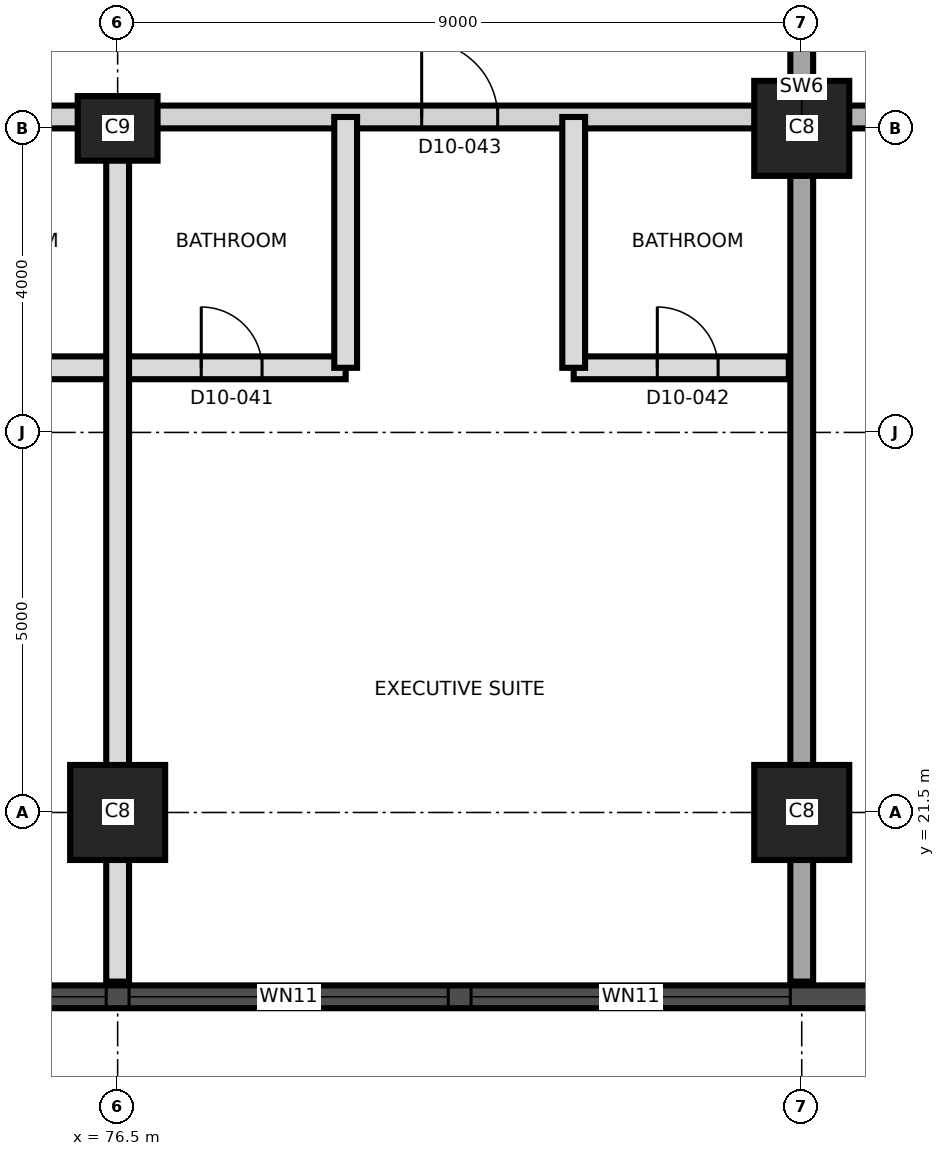
"""IFC4 building model, lengths in metres.
Left out: names, types, materials, properties, quantities, classifications, styles, units other than length and angle.
Written with IfcOpenShell. Run it as: python <this file> out.ifc"""

import sys

from ifc_helpers import new_model, si_unit, direction, frame, frame_2d, origin, origin_2d, place, context, subcontext, project, spatial, rectangle, extrude, element, fill, save


model = new_model("IFC4")
c1 = context("Model", 3, precision=1e-05, world=origin(), true_north=direction((0.0, 1.0)))
c2 = subcontext(c1, "Body", "Model", "MODEL_VIEW")
j1 = project(units=[si_unit("LENGTHUNIT", "METRE"), si_unit("PLANEANGLEUNIT", "RADIAN")], contexts=[c1])
p1 = place(None, origin())
s1 = spatial("IfcSite", under=j1, at=p1, CompositionType="ELEMENT")
p2 = place(p1, origin())
s2 = spatial("IfcBuilding", under=s1, at=p2, CompositionType="ELEMENT")
p3 = place(p2, frame((0.0, 0.0, 120.4)))
s3 = spatial("IfcBuildingStorey", under=s2, at=p3, CompositionType="ELEMENT", Elevation=120.4)
for number, where, z_axis, x_axis in (
    (1, (76.5, 21.5, 0.0), (0.0, 0.0, 1.0), (1.0, 0.0, 0.0)),
    (2, (85.5, 21.5, 0.0), (0.0, 0.0, 1.0), (1.0, 0.0, 0.0)),
):
    element("IfcColumn", number, at=place(p3, frame(where, z_axis=z_axis, x_axis=x_axis)), inside=s3, PredefinedType="COLUMN", context=c2, shape_type="SweptSolid", body=[
        extrude(rectangle(XDim=1.25, YDim=1.25, at=origin_2d()), origin(), (0.0, 0.0, 1.0), 3.7),
    ])
p4 = place(p3, frame((76.5, 30.5, 0.0), z_axis=(0.0, 0.0, 1.0), x_axis=(1.0, 0.0, 0.0)))
e3 = element("IfcColumn", 3, at=p4, inside=s3, PredefinedType="COLUMN", context=c2, shape_type="SweptSolid", body=[
    extrude(rectangle(XDim=1.05, YDim=0.85, at=origin_2d()), origin(), (0.0, 0.0, 1.0), 3.7),
])
p5 = place(p3, frame((85.5, 30.5, 0.0), z_axis=(0.0, 0.0, 1.0), x_axis=(1.0, 0.0, 0.0)))
e4 = element("IfcColumn", 4, at=p5, inside=s3, PredefinedType="COLUMN", context=c2, shape_type="SweptSolid", body=[
    extrude(rectangle(XDim=1.25, YDim=1.25, at=origin_2d()), origin(), (0.0, 0.0, 1.0), 3.7),
])
p6 = place(p3, frame((85.5, 19.275, 0.0), z_axis=(0.0, 0.0, 1.0), x_axis=(0.0, 1.0, 0.0)))
e5 = element("IfcWall", 5, at=p6, inside=s3, PredefinedType="SHEAR", context=c2, shape_type="SweptSolid", body=[
    extrude(rectangle(XDim=22.45, YDim=0.3, at=frame_2d((11.225, 0.0))), origin(), (0.0, 0.0, 1.0), 3.7),
])
p7 = place(p6, frame((12.425, 0.0, 0.0)))
e6 = element("IfcOpeningElement", 6, at=p7, cuts=e5, PredefinedType="OPENING", context=c2, shape_type="SweptSolid", body=[
    extrude(rectangle(XDim=1.4, YDim=2.1, at=frame_2d((0.7, 1.05))), frame((0.0, 0.16, 0.0), z_axis=(0.0, -1.0, 0.0), x_axis=(1.0, 0.0, 0.0)), (0.0, 0.0, 1.0), 0.32),
])
p8 = place(p3, frame((44.01, 19.075, 0.0), z_axis=(0.0, 0.0, 1.0), x_axis=(1.0, 0.0, 0.0)))
e7 = element("IfcWall", 7, at=p8, inside=s3, PredefinedType="SOLIDWALL", context=c2, shape_type="SweptSolid", body=[
    extrude(rectangle(XDim=43.478, YDim=0.3, at=frame_2d((21.739, 0.0))), origin(), (0.0, 0.0, 1.0), 3.4),
])
p9 = place(p8, frame((1.845, 0.0, 0.3)))
e8 = element("IfcOpeningElement", 8, at=p9, cuts=e7, PredefinedType="OPENING", context=c2, shape_type="SweptSolid", body=[
    extrude(rectangle(XDim=1.8, YDim=2.4, at=frame_2d((0.9, 1.2))), frame((0.0, 0.16, 0.0), z_axis=(0.0, -1.0, 0.0), x_axis=(1.0, 0.0, 0.0)), (0.0, 0.0, 1.0), 0.32),
])
p10 = place(p8, frame((5.64, 0.0, 0.9)))
e9 = element("IfcOpeningElement", 9, at=p10, cuts=e7, PredefinedType="OPENING", context=c2, shape_type="SweptSolid", body=[
    extrude(rectangle(XDim=4.2, YDim=1.5, at=frame_2d((2.1, 0.75))), frame((0.0, 0.16, 0.0), z_axis=(0.0, -1.0, 0.0), x_axis=(1.0, 0.0, 0.0)), (0.0, 0.0, 1.0), 0.32),
])
p11 = place(p8, frame((10.14, 0.0, 0.9)))
e10 = element("IfcOpeningElement", 10, at=p11, cuts=e7, PredefinedType="OPENING", context=c2, shape_type="SweptSolid", body=[
    extrude(rectangle(XDim=4.2, YDim=1.5, at=frame_2d((2.1, 0.75))), frame((0.0, 0.16, 0.0), z_axis=(0.0, -1.0, 0.0), x_axis=(1.0, 0.0, 0.0)), (0.0, 0.0, 1.0), 0.32),
])
p12 = place(p8, frame((14.64, 0.0, 0.9)))
e11 = element("IfcOpeningElement", 11, at=p12, cuts=e7, PredefinedType="OPENING", context=c2, shape_type="SweptSolid", body=[
    extrude(rectangle(XDim=4.2, YDim=1.5, at=frame_2d((2.1, 0.75))), frame((0.0, 0.16, 0.0), z_axis=(0.0, -1.0, 0.0), x_axis=(1.0, 0.0, 0.0)), (0.0, 0.0, 1.0), 0.32),
])
p13 = place(p8, frame((19.14, 0.0, 0.9)))
e12 = element("IfcOpeningElement", 12, at=p13, cuts=e7, PredefinedType="OPENING", context=c2, shape_type="SweptSolid", body=[
    extrude(rectangle(XDim=4.2, YDim=1.5, at=frame_2d((2.1, 0.75))), frame((0.0, 0.16, 0.0), z_axis=(0.0, -1.0, 0.0), x_axis=(1.0, 0.0, 0.0)), (0.0, 0.0, 1.0), 0.32),
])
p14 = place(p8, frame((23.64, 0.0, 0.9)))
e13 = element("IfcOpeningElement", 13, at=p14, cuts=e7, PredefinedType="OPENING", context=c2, shape_type="SweptSolid", body=[
    extrude(rectangle(XDim=4.2, YDim=1.5, at=frame_2d((2.1, 0.75))), frame((0.0, 0.16, 0.0), z_axis=(0.0, -1.0, 0.0), x_axis=(1.0, 0.0, 0.0)), (0.0, 0.0, 1.0), 0.32),
])
p15 = place(p8, frame((28.14, 0.0, 0.9)))
e14 = element("IfcOpeningElement", 14, at=p15, cuts=e7, PredefinedType="OPENING", context=c2, shape_type="SweptSolid", body=[
    extrude(rectangle(XDim=4.2, YDim=1.5, at=frame_2d((2.1, 0.75))), frame((0.0, 0.16, 0.0), z_axis=(0.0, -1.0, 0.0), x_axis=(1.0, 0.0, 0.0)), (0.0, 0.0, 1.0), 0.32),
])
p16 = place(p8, frame((32.64, 0.0, 0.9)))
e15 = element("IfcOpeningElement", 15, at=p16, cuts=e7, PredefinedType="OPENING", context=c2, shape_type="SweptSolid", body=[
    extrude(rectangle(XDim=4.2, YDim=1.5, at=frame_2d((2.1, 0.75))), frame((0.0, 0.16, 0.0), z_axis=(0.0, -1.0, 0.0), x_axis=(1.0, 0.0, 0.0)), (0.0, 0.0, 1.0), 0.32),
])
p17 = place(p8, frame((37.14, 0.0, 0.9)))
e16 = element("IfcOpeningElement", 16, at=p17, cuts=e7, PredefinedType="OPENING", context=c2, shape_type="SweptSolid", body=[
    extrude(rectangle(XDim=4.2, YDim=1.5, at=frame_2d((2.1, 0.75))), frame((0.0, 0.16, 0.0), z_axis=(0.0, -1.0, 0.0), x_axis=(1.0, 0.0, 0.0)), (0.0, 0.0, 1.0), 0.32),
])
p18 = place(p3, frame((73.5, 27.35, 0.0), z_axis=(0.0, 0.0, 1.0), x_axis=(1.0, 0.0, 0.0)))
e17 = element("IfcWall", 17, at=p18, inside=s3, PredefinedType="PARTITIONING", context=c2, shape_type="SweptSolid", body=[
    extrude(rectangle(XDim=6.0, YDim=0.3, at=frame_2d((3.0, 0.0))), origin(), (0.0, 0.0, 1.0), 3.4),
])
p19 = place(p18, frame((1.1, 0.0, 0.0)))
e18 = element("IfcOpeningElement", 18, at=p19, cuts=e17, PredefinedType="OPENING", context=c2, shape_type="SweptSolid", body=[
    extrude(rectangle(XDim=0.8, YDim=2.1, at=frame_2d((0.4, 1.05))), frame((0.0, 0.16, 0.0), z_axis=(0.0, -1.0, 0.0), x_axis=(1.0, 0.0, 0.0)), (0.0, 0.0, 1.0), 0.32),
])
p20 = place(p18, frame((4.1, 0.0, 0.0)))
e19 = element("IfcOpeningElement", 19, at=p20, cuts=e17, PredefinedType="OPENING", context=c2, shape_type="SweptSolid", body=[
    extrude(rectangle(XDim=0.8, YDim=2.1, at=frame_2d((0.4, 1.05))), frame((0.0, 0.16, 0.0), z_axis=(0.0, -1.0, 0.0), x_axis=(1.0, 0.0, 0.0)), (0.0, 0.0, 1.0), 0.32),
])
p21 = place(p3, frame((82.5, 27.35, 0.0), z_axis=(0.0, 0.0, 1.0), x_axis=(1.0, 0.0, 0.0)))
e20 = element("IfcWall", 20, at=p21, inside=s3, PredefinedType="PARTITIONING", context=c2, shape_type="SweptSolid", body=[
    extrude(rectangle(XDim=2.83, YDim=0.3, at=frame_2d((1.415, 0.0))), origin(), (0.0, 0.0, 1.0), 3.4),
])
p22 = place(p21, frame((1.1, 0.0, 0.0)))
e21 = element("IfcOpeningElement", 21, at=p22, cuts=e20, PredefinedType="OPENING", context=c2, shape_type="SweptSolid", body=[
    extrude(rectangle(XDim=0.8, YDim=2.1, at=frame_2d((0.4, 1.05))), frame((0.0, 0.16, 0.0), z_axis=(0.0, -1.0, 0.0), x_axis=(1.0, 0.0, 0.0)), (0.0, 0.0, 1.0), 0.32),
])
p23 = place(p3, frame((58.8, 30.65, 0.0), z_axis=(0.0, 0.0, 1.0), x_axis=(1.0, 0.0, 0.0)))
e22 = element("IfcWall", 22, at=p23, inside=s3, PredefinedType="PARTITIONING", context=c2, shape_type="SweptSolid", body=[
    extrude(rectangle(XDim=26.53, YDim=0.3, at=frame_2d((13.265, 0.0))), origin(), (0.0, 0.0, 1.0), 3.4),
])
p24 = place(p23, frame((0.835, 0.0, 0.0)))
e23 = element("IfcOpeningElement", 23, at=p24, cuts=e22, PredefinedType="OPENING", context=c2, shape_type="SweptSolid", body=[
    extrude(rectangle(XDim=1.2, YDim=2.1, at=frame_2d((0.6, 1.05))), frame((0.0, 0.16, 0.0), z_axis=(0.0, -1.0, 0.0), x_axis=(1.0, 0.0, 0.0)), (0.0, 0.0, 1.0), 0.32),
])
p25 = place(p23, frame((4.085, 0.0, 0.0)))
e24 = element("IfcOpeningElement", 24, at=p25, cuts=e22, PredefinedType="OPENING", context=c2, shape_type="SweptSolid", body=[
    extrude(rectangle(XDim=1.0, YDim=2.1, at=frame_2d((0.5, 1.05))), frame((0.0, 0.16, 0.0), z_axis=(0.0, -1.0, 0.0), x_axis=(1.0, 0.0, 0.0)), (0.0, 0.0, 1.0), 0.32),
])
p26 = place(p23, frame((12.7, 0.0, 0.0)))
e25 = element("IfcOpeningElement", 25, at=p26, cuts=e22, PredefinedType="OPENING", context=c2, shape_type="SweptSolid", body=[
    extrude(rectangle(XDim=1.0, YDim=2.4, at=frame_2d((0.5, 1.2))), frame((0.0, 0.16, 0.0), z_axis=(0.0, -1.0, 0.0), x_axis=(1.0, 0.0, 0.0)), (0.0, 0.0, 1.0), 0.32),
])
p27 = place(p23, frame((21.7, 0.0, 0.0)))
e26 = element("IfcOpeningElement", 26, at=p27, cuts=e22, PredefinedType="OPENING", context=c2, shape_type="SweptSolid", body=[
    extrude(rectangle(XDim=1.0, YDim=2.4, at=frame_2d((0.5, 1.2))), frame((0.0, 0.16, 0.0), z_axis=(0.0, -1.0, 0.0), x_axis=(1.0, 0.0, 0.0)), (0.0, 0.0, 1.0), 0.32),
])
p28 = place(p3, frame((85.67, 30.65, 0.0), z_axis=(0.0, 0.0, 1.0), x_axis=(1.0, 0.0, 0.0)))
e27 = element("IfcWall", 27, at=p28, inside=s3, PredefinedType="SHEAR", context=c2, shape_type="SweptSolid", body=[
    extrude(rectangle(XDim=9.58, YDim=0.3, at=frame_2d((4.79, 0.0))), origin(), (0.0, 0.0, 1.0), 3.4),
])
p29 = place(p28, frame((2.08, 0.0, 0.0)))
e28 = element("IfcOpeningElement", 28, at=p29, cuts=e27, PredefinedType="OPENING", context=c2, shape_type="SweptSolid", body=[
    extrude(rectangle(XDim=1.2, YDim=2.1, at=frame_2d((0.6, 1.05))), frame((0.0, 0.16, 0.0), z_axis=(0.0, -1.0, 0.0), x_axis=(1.0, 0.0, 0.0)), (0.0, 0.0, 1.0), 0.32),
])
p30 = place(p28, frame((5.63, 0.0, 0.0)))
e29 = element("IfcOpeningElement", 29, at=p30, cuts=e27, PredefinedType="OPENING", context=c2, shape_type="SweptSolid", body=[
    extrude(rectangle(XDim=1.0, YDim=2.1, at=frame_2d((0.5, 1.05))), frame((0.0, 0.16, 0.0), z_axis=(0.0, -1.0, 0.0), x_axis=(1.0, 0.0, 0.0)), (0.0, 0.0, 1.0), 0.32),
])
p31 = place(p3, frame((76.5, 19.275, 0.0), z_axis=(0.0, 0.0, 1.0), x_axis=(0.0, 1.0, 0.0)))
e30 = element("IfcWall", 30, at=p31, inside=s3, PredefinedType="PARTITIONING", context=c2, shape_type="SweptSolid", body=[
    extrude(rectangle(XDim=11.375, YDim=0.3, at=frame_2d((5.688, 0.0))), origin(), (0.0, 0.0, 1.0), 3.35),
])
for number, where, z_axis, x_axis in (
    (31, (79.5, 27.35, 0.0), (0.0, 0.0, 1.0), (0.0, 1.0, 0.0)),
    (32, (82.5, 27.35, 0.0), (0.0, 0.0, 1.0), (0.0, 1.0, 0.0)),
):
    element("IfcWall", number, at=place(p3, frame(where, z_axis=z_axis, x_axis=x_axis)), inside=s3, PredefinedType="PARTITIONING", context=c2, shape_type="SweptSolid", body=[
        extrude(rectangle(XDim=3.3, YDim=0.3, at=frame_2d((1.65, 0.0))), origin(), (0.0, 0.0, 1.0), 3.4),
    ])
p32 = place(p15, origin())
e33 = element("IfcWindow", 33, at=p32, inside=s3, PartitioningType="SINGLE_PANEL", PredefinedType="WINDOW", context=c2, shape_type="SweptSolid", body=[
    extrude(rectangle(XDim=4.2, YDim=1.5, at=frame_2d((2.1, 0.75))), frame((0.0, 0.03, 0.0), z_axis=(0.0, -1.0, 0.0), x_axis=(1.0, 0.0, 0.0)), (0.0, 0.0, 1.0), 0.06),
])
fill(e14, e33)
p33 = place(p16, origin())
e34 = element("IfcWindow", 34, at=p33, inside=s3, PartitioningType="SINGLE_PANEL", PredefinedType="WINDOW", context=c2, shape_type="SweptSolid", body=[
    extrude(rectangle(XDim=4.2, YDim=1.5, at=frame_2d((2.1, 0.75))), frame((0.0, 0.03, 0.0), z_axis=(0.0, -1.0, 0.0), x_axis=(1.0, 0.0, 0.0)), (0.0, 0.0, 1.0), 0.06),
])
fill(e15, e34)
p34 = place(p17, origin())
e35 = element("IfcWindow", 35, at=p34, inside=s3, PartitioningType="SINGLE_PANEL", PredefinedType="WINDOW", context=c2, shape_type="SweptSolid", body=[
    extrude(rectangle(XDim=4.2, YDim=1.5, at=frame_2d((2.1, 0.75))), frame((0.0, 0.03, 0.0), z_axis=(0.0, -1.0, 0.0), x_axis=(1.0, 0.0, 0.0)), (0.0, 0.0, 1.0), 0.06),
])
fill(e16, e35)
p35 = place(p20, origin())
e36 = element("IfcDoor", 36, at=p35, inside=s3, OperationType="SINGLE_SWING_LEFT", PredefinedType="DOOR", context=c2, shape_type="SweptSolid", body=[
    extrude(rectangle(XDim=0.8, YDim=2.1, at=frame_2d((0.4, 1.05))), frame((0.0, 0.025, 0.0), z_axis=(0.0, -1.0, 0.0), x_axis=(1.0, 0.0, 0.0)), (0.0, 0.0, 1.0), 0.05),
])
fill(e19, e36)
p36 = place(p22, origin())
e37 = element("IfcDoor", 37, at=p36, inside=s3, OperationType="SINGLE_SWING_RIGHT", PredefinedType="DOOR", context=c2, shape_type="SweptSolid", body=[
    extrude(rectangle(XDim=0.8, YDim=2.1, at=frame_2d((0.4, 1.05))), frame((0.0, 0.025, 0.0), z_axis=(0.0, -1.0, 0.0), x_axis=(1.0, 0.0, 0.0)), (0.0, 0.0, 1.0), 0.05),
])
fill(e21, e37)
p37 = place(p27, origin())
e38 = element("IfcDoor", 38, at=p37, inside=s3, OperationType="SINGLE_SWING_LEFT", PredefinedType="DOOR", context=c2, shape_type="SweptSolid", body=[
    extrude(rectangle(XDim=1.0, YDim=2.4, at=frame_2d((0.5, 1.2))), frame((0.0, 0.025, 0.0), z_axis=(0.0, -1.0, 0.0), x_axis=(1.0, 0.0, 0.0)), (0.0, 0.0, 1.0), 0.05),
])
fill(e26, e38)
save(model, sys.argv[1])
